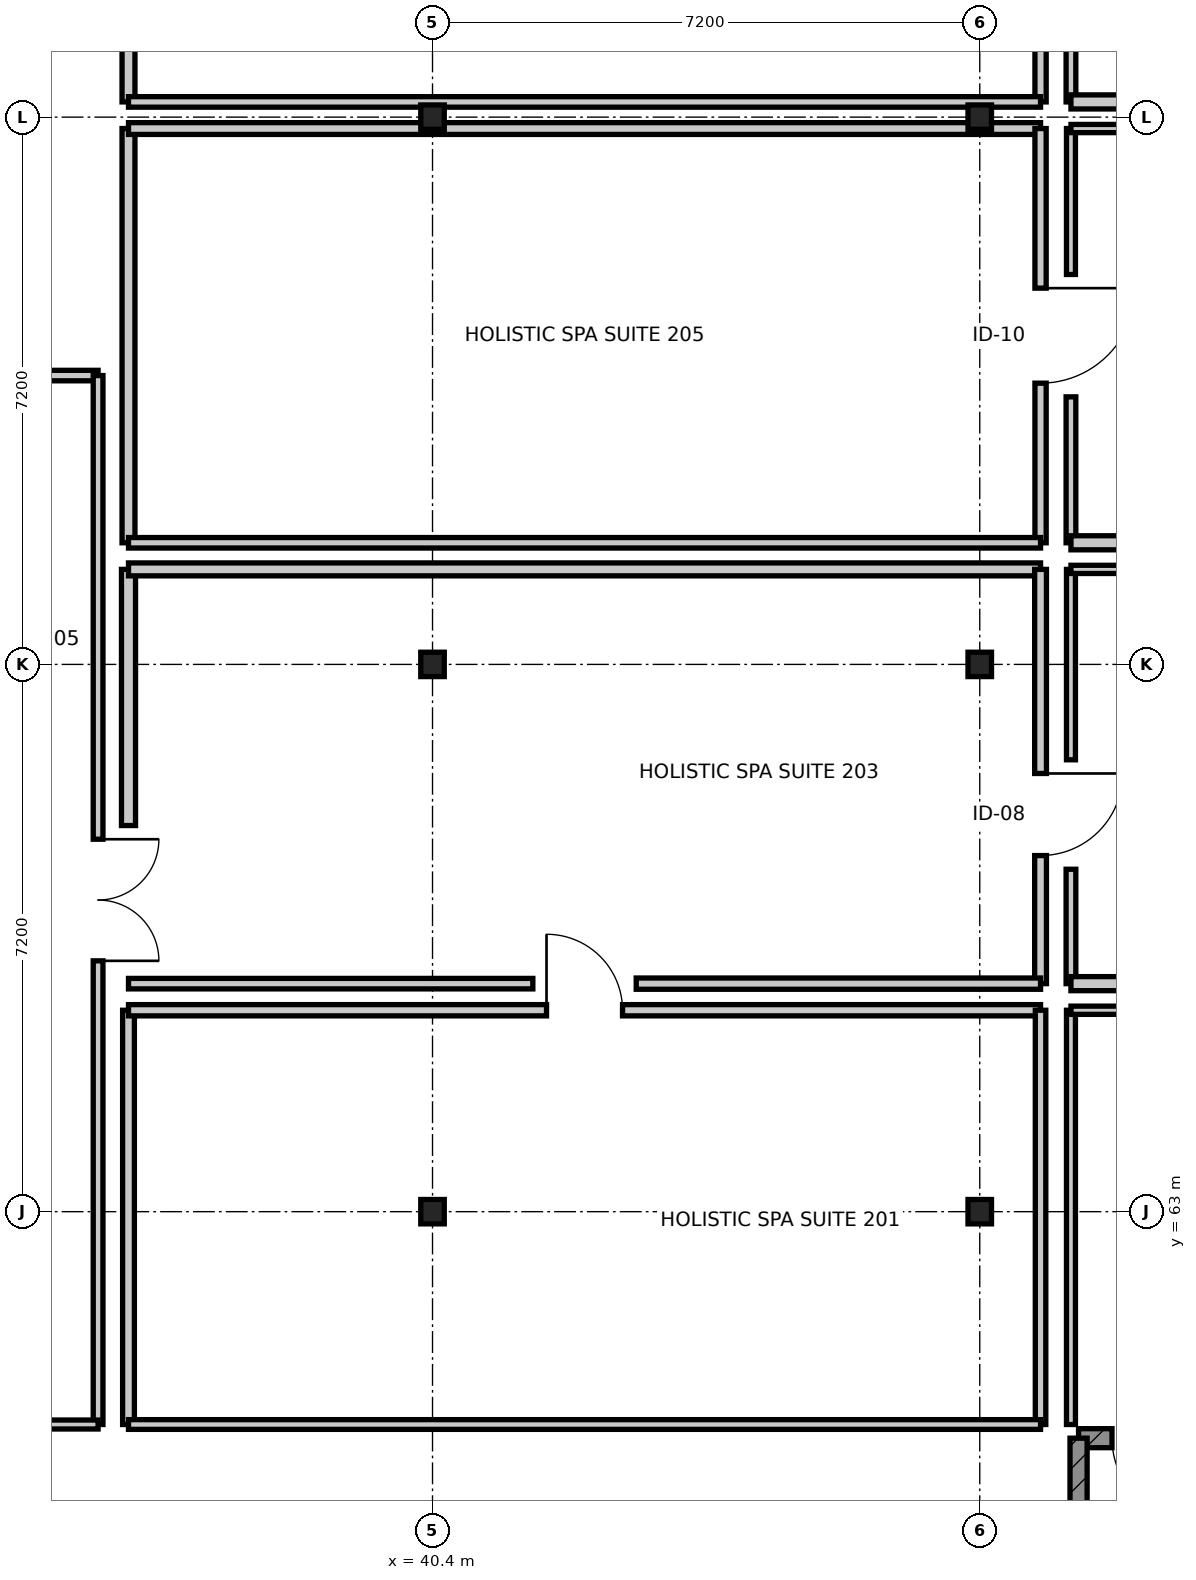
"""IFC4 building model, lengths in metres.
Left out: names, types, materials, properties, quantities, classifications, styles, units other than length and angle.
Written with IfcOpenShell. Run it as: python <this file> out.ifc"""

import sys

from ifc_helpers import new_model, si_unit, direction, frame, frame_2d, origin, origin_2d, place, context, subcontext, project, spatial, rectangle, i_section, extrude, element, fill, save


model = new_model("IFC4")
c1 = context("Model", 3, precision=1e-05, world=origin(), true_north=direction((0.0, 1.0)))
c2 = subcontext(c1, "Body", "Model", "MODEL_VIEW")
j1 = project(units=[si_unit("LENGTHUNIT", "METRE"), si_unit("PLANEANGLEUNIT", "RADIAN")], contexts=[c1])
p1 = place(None, origin())
s1 = spatial("IfcSite", under=j1, at=p1, CompositionType="ELEMENT")
p2 = place(p1, origin())
s2 = spatial("IfcBuilding", under=s1, at=p2, CompositionType="ELEMENT")
p3 = place(p2, frame((0.0, 0.0, 10.5)))
s3 = spatial("IfcBuildingStorey", under=s2, at=p3, CompositionType="ELEMENT", Elevation=10.5)
for number, where, z_axis, x_axis in (
    (1, (40.4, 63.0, 0.0), (0.0, 0.0, 1.0), (1.0, 0.0, 0.0)),
    (2, (40.4, 70.2, 0.0), (0.0, 0.0, 1.0), (1.0, 0.0, 0.0)),
    (3, (40.4, 77.4, 0.0), (0.0, 0.0, 1.0), (1.0, 0.0, 0.0)),
    (4, (47.6, 63.0, 0.0), (0.0, 0.0, 1.0), (1.0, 0.0, 0.0)),
    (5, (47.6, 70.2, 0.0), (0.0, 0.0, 1.0), (1.0, 0.0, 0.0)),
    (6, (47.6, 77.4, 0.0), (0.0, 0.0, 1.0), (1.0, 0.0, 0.0)),
):
    element("IfcColumn", number, at=place(p3, frame(where, z_axis=z_axis, x_axis=x_axis)), inside=s3, PredefinedType="COLUMN", context=c2, shape_type="SweptSolid", body=[
        extrude(i_section(OverallWidth=0.309, OverallDepth=0.321, WebThickness=0.014, FlangeThickness=0.022, FilletRadius=0.015, at=origin_2d()), origin(), (0.0, 0.0, 1.0), 4.5),
    ])
p4 = place(p3, frame((57.5, 60.02, 0.0), z_axis=(0.0, 0.0, 1.0), x_axis=(-1.0, 0.0, 0.0)))
e7 = element("IfcWall", 7, at=p4, inside=s3, PredefinedType="SHEAR", context=c2, shape_type="SweptSolid", body=[
    extrude(rectangle(XDim=8.6, YDim=0.25, at=frame_2d((4.3, 0.0))), origin(), (0.0, 0.0, 1.0), 4.22),
])
p5 = place(p4, frame((7.06, 0.0, 0.0)))
e8 = element("IfcOpeningElement", 8, at=p5, cuts=e7, PredefinedType="OPENING", context=c2, shape_type="SweptSolid", body=[
    extrude(rectangle(XDim=1.1, YDim=2.1, at=frame_2d((0.55, 1.05))), frame((0.0, 0.135, 0.0), z_axis=(0.0, -1.0, 0.0), x_axis=(1.0, 0.0, 0.0)), (0.0, 0.0, 1.0), 0.27),
])
p6 = place(p3, frame((48.9, 60.02, 0.0), z_axis=(0.0, 0.0, 1.0), x_axis=(0.0, -1.0, 0.0)))
e9 = element("IfcWall", 9, at=p6, inside=s3, PredefinedType="SHEAR", context=c2, shape_type="SweptSolid", body=[
    extrude(rectangle(XDim=3.72, YDim=0.225, at=frame_2d((1.86, 0.0))), origin(), (0.0, 0.0, 1.0), 4.22),
])
p7 = place(p3, frame((12.2, 74.0, 0.0), z_axis=(0.0, 0.0, 1.0), x_axis=(1.0, 0.0, 0.0)))
e10 = element("IfcWall", 10, at=p7, inside=s3, PredefinedType="PARTITIONING", context=c2, shape_type="SweptSolid", body=[
    extrude(rectangle(XDim=23.8, YDim=0.138, at=frame_2d((11.9, 0.0))), origin(), (0.0, 0.0, 1.0), 3.796),
])
p8 = place(p3, frame((36.0, 74.0, 0.0), z_axis=(0.0, 0.0, 1.0), x_axis=(0.0, -1.0, 0.0)))
e11 = element("IfcWall", 11, at=p8, inside=s3, PredefinedType="PARTITIONING", context=c2, shape_type="SweptSolid", body=[
    extrude(rectangle(XDim=13.8, YDim=0.128, at=frame_2d((6.9, 0.0))), origin(), (0.0, 0.0, 1.0), 3.555),
])
p9 = place(p8, frame((6.1, 0.0, 0.0)))
e12 = element("IfcOpeningElement", 12, at=p9, cuts=e11, PredefinedType="OPENING", context=c2, shape_type="SweptSolid", body=[
    extrude(rectangle(XDim=1.6, YDim=2.15, at=frame_2d((0.8, 1.075))), frame((0.0, 0.074, 0.0), z_axis=(0.0, -1.0, 0.0), x_axis=(1.0, 0.0, 0.0)), (0.0, 0.0, 1.0), 0.148),
])
p10 = place(p3, frame((36.0, 60.2, 0.0), z_axis=(0.0, 0.0, 1.0), x_axis=(-1.0, 0.0, 0.0)))
e13 = element("IfcWall", 13, at=p10, inside=s3, PredefinedType="PARTITIONING", context=c2, shape_type="SweptSolid", body=[
    extrude(rectangle(XDim=23.8, YDim=0.118, at=frame_2d((11.9, 0.0))), origin(), (0.0, 0.0, 1.0), 3.796),
])
p11 = place(p3, frame((36.4, 60.2, 0.0), z_axis=(0.0, 0.0, 1.0), x_axis=(0.0, 1.0, 0.0)))
e14 = element("IfcWall", 14, at=p11, inside=s3, PredefinedType="PARTITIONING", context=c2, shape_type="SweptSolid", body=[
    extrude(rectangle(XDim=5.45, YDim=0.155, at=frame_2d((2.725, 0.0))), origin(), (0.0, 0.0, 1.0), 3.555),
])
p12 = place(p3, frame((36.4, 65.65, 0.0), z_axis=(0.0, 0.0, 1.0), x_axis=(1.0, 0.0, 0.0)))
e15 = element("IfcWall", 15, at=p12, inside=s3, PredefinedType="PARTITIONING", context=c2, shape_type="SweptSolid", body=[
    extrude(rectangle(XDim=12.0, YDim=0.148, at=frame_2d((6.0, 0.0))), origin(), (0.0, 0.0, 1.0), 3.796),
])
p13 = place(p12, frame((5.5, 0.0, 0.0)))
e16 = element("IfcOpeningElement", 16, at=p13, cuts=e15, PredefinedType="OPENING", context=c2, shape_type="SweptSolid", body=[
    extrude(rectangle(XDim=1.0, YDim=2.1, at=frame_2d((0.5, 1.05))), frame((0.0, 0.084, 0.0), z_axis=(0.0, -1.0, 0.0), x_axis=(1.0, 0.0, 0.0)), (0.0, 0.0, 1.0), 0.168),
])
p14 = place(p3, frame((48.4, 65.65, 0.0), z_axis=(0.0, 0.0, 1.0), x_axis=(0.0, -1.0, 0.0)))
e17 = element("IfcWall", 17, at=p14, inside=s3, PredefinedType="PARTITIONING", context=c2, shape_type="SweptSolid", body=[
    extrude(rectangle(XDim=5.45, YDim=0.138, at=frame_2d((2.725, 0.0))), origin(), (0.0, 0.0, 1.0), 3.555),
])
p15 = place(p3, frame((48.4, 60.2, 0.0), z_axis=(0.0, 0.0, 1.0), x_axis=(-1.0, 0.0, 0.0)))
e18 = element("IfcWall", 18, at=p15, inside=s3, PredefinedType="PARTITIONING", context=c2, shape_type="SweptSolid", body=[
    extrude(rectangle(XDim=12.0, YDim=0.128, at=frame_2d((6.0, 0.0))), origin(), (0.0, 0.0, 1.0), 3.796),
])
p16 = place(p3, frame((48.8, 60.2, 0.0), z_axis=(0.0, 0.0, 1.0), x_axis=(0.0, 1.0, 0.0)))
e19 = element("IfcWall", 19, at=p16, inside=s3, PredefinedType="PARTITIONING", context=c2, shape_type="SweptSolid", body=[
    extrude(rectangle(XDim=5.45, YDim=0.118, at=frame_2d((2.725, 0.0))), origin(), (0.0, 0.0, 1.0), 3.555),
])
p17 = place(p3, frame((48.8, 65.65, 0.0), z_axis=(0.0, 0.0, 1.0), x_axis=(1.0, 0.0, 0.0)))
e20 = element("IfcWall", 20, at=p17, inside=s3, PredefinedType="PARTITIONING", context=c2, shape_type="SweptSolid", body=[
    extrude(rectangle(XDim=12.0, YDim=0.108, at=frame_2d((6.0, 0.0))), origin(), (0.0, 0.0, 1.0), 3.796),
])
p18 = place(p3, frame((36.4, 68.08, 0.0), z_axis=(0.0, 0.0, 1.0), x_axis=(0.0, 1.0, 0.0)))
e21 = element("IfcWall", 21, at=p18, inside=s3, PredefinedType="PARTITIONING", context=c2, shape_type="SweptSolid", body=[
    extrude(rectangle(XDim=3.37, YDim=0.185, at=frame_2d((1.685, 0.0))), origin(), (0.0, 0.0, 1.0), 3.555),
])
p19 = place(p3, frame((36.4, 71.45, 0.0), z_axis=(0.0, 0.0, 1.0), x_axis=(1.0, 0.0, 0.0)))
e22 = element("IfcWall", 22, at=p19, inside=s3, PredefinedType="PARTITIONING", context=c2, shape_type="SweptSolid", body=[
    extrude(rectangle(XDim=12.0, YDim=0.17, at=frame_2d((6.0, 0.0))), origin(), (0.0, 0.0, 1.0), 3.796),
])
p20 = place(p3, frame((48.4, 71.45, 0.0), z_axis=(0.0, 0.0, 1.0), x_axis=(0.0, -1.0, 0.0)))
e23 = element("IfcWall", 23, at=p20, inside=s3, PredefinedType="PARTITIONING", context=c2, shape_type="SweptSolid", body=[
    extrude(rectangle(XDim=5.45, YDim=0.155, at=frame_2d((2.725, 0.0))), origin(), (0.0, 0.0, 1.0), 3.555),
])
p21 = place(p20, frame((2.685, 0.0, 0.0)))
e24 = element("IfcOpeningElement", 24, at=p21, cuts=e23, PredefinedType="OPENING", context=c2, shape_type="SweptSolid", body=[
    extrude(rectangle(XDim=1.08, YDim=2.15, at=frame_2d((0.54, 1.075))), frame((0.0, 0.087, 0.0), z_axis=(0.0, -1.0, 0.0), x_axis=(1.0, 0.0, 0.0)), (0.0, 0.0, 1.0), 0.175),
])
p22 = place(p3, frame((48.4, 66.0, 0.0), z_axis=(0.0, 0.0, 1.0), x_axis=(-1.0, 0.0, 0.0)))
e25 = element("IfcWall", 25, at=p22, inside=s3, PredefinedType="PARTITIONING", context=c2, shape_type="SweptSolid", body=[
    extrude(rectangle(XDim=5.32, YDim=0.148, at=frame_2d((2.66, 0.0))), origin(), (0.0, 0.0, 1.0), 3.796),
])
p23 = place(p3, frame((41.72, 66.0, 0.0), z_axis=(0.0, 0.0, 1.0), x_axis=(-1.0, 0.0, 0.0)))
e26 = element("IfcWall", 26, at=p23, inside=s3, PredefinedType="PARTITIONING", context=c2, shape_type="SweptSolid", body=[
    extrude(rectangle(XDim=5.32, YDim=0.138, at=frame_2d((2.66, 0.0))), origin(), (0.0, 0.0, 1.0), 3.796),
])
p24 = place(p3, frame((48.8, 66.0, 0.0), z_axis=(0.0, 0.0, 1.0), x_axis=(0.0, 1.0, 0.0)))
e27 = element("IfcWall", 27, at=p24, inside=s3, PredefinedType="PARTITIONING", context=c2, shape_type="SweptSolid", body=[
    extrude(rectangle(XDim=1.505, YDim=0.128, at=frame_2d((0.752, 0.0))), origin(), (0.0, 0.0, 1.0), 3.898),
])
p25 = place(p3, frame((48.8, 68.945, 0.0), z_axis=(0.0, 0.0, 1.0), x_axis=(0.0, 1.0, 0.0)))
e28 = element("IfcWall", 28, at=p25, inside=s3, PredefinedType="PARTITIONING", context=c2, shape_type="SweptSolid", body=[
    extrude(rectangle(XDim=2.505, YDim=0.118, at=frame_2d((1.252, 0.0))), origin(), (0.0, 0.0, 1.0), 3.555),
])
p26 = place(p3, frame((48.8, 71.45, 0.0), z_axis=(0.0, 0.0, 1.0), x_axis=(1.0, 0.0, 0.0)))
e29 = element("IfcWall", 29, at=p26, inside=s3, PredefinedType="PARTITIONING", context=c2, shape_type="SweptSolid", body=[
    extrude(rectangle(XDim=12.0, YDim=0.108, at=frame_2d((6.0, 0.0))), origin(), (0.0, 0.0, 1.0), 3.796),
])
p27 = place(p3, frame((60.8, 66.0, 0.0), z_axis=(0.0, 0.0, 1.0), x_axis=(-1.0, 0.0, 0.0)))
e30 = element("IfcWall", 30, at=p27, inside=s3, PredefinedType="PARTITIONING", context=c2, shape_type="SweptSolid", body=[
    extrude(rectangle(XDim=12.0, YDim=0.185, at=frame_2d((6.0, 0.0))), origin(), (0.0, 0.0, 1.0), 3.796),
])
p28 = place(p3, frame((36.4, 71.8, 0.0), z_axis=(0.0, 0.0, 1.0), x_axis=(0.0, 1.0, 0.0)))
e31 = element("IfcWall", 31, at=p28, inside=s3, PredefinedType="PARTITIONING", context=c2, shape_type="SweptSolid", body=[
    extrude(rectangle(XDim=5.45, YDim=0.17, at=frame_2d((2.725, 0.0))), origin(), (0.0, 0.0, 1.0), 3.555),
])
p29 = place(p3, frame((36.4, 77.25, 0.0), z_axis=(0.0, 0.0, 1.0), x_axis=(1.0, 0.0, 0.0)))
e32 = element("IfcWall", 32, at=p29, inside=s3, PredefinedType="PARTITIONING", context=c2, shape_type="SweptSolid", body=[
    extrude(rectangle(XDim=12.0, YDim=0.155, at=frame_2d((6.0, 0.0))), origin(), (0.0, 0.0, 1.0), 3.555),
])
p30 = place(p3, frame((48.4, 77.25, 0.0), z_axis=(0.0, 0.0, 1.0), x_axis=(0.0, -1.0, 0.0)))
e33 = element("IfcWall", 33, at=p30, inside=s3, PredefinedType="PARTITIONING", context=c2, shape_type="SweptSolid", body=[
    extrude(rectangle(XDim=5.45, YDim=0.148, at=frame_2d((2.725, 0.0))), origin(), (0.0, 0.0, 1.0), 3.555),
])
p31 = place(p30, frame((2.1, 0.0, 0.0)))
e34 = element("IfcOpeningElement", 34, at=p31, cuts=e33, PredefinedType="OPENING", context=c2, shape_type="SweptSolid", body=[
    extrude(rectangle(XDim=1.25, YDim=2.2, at=frame_2d((0.625, 1.1))), frame((0.0, 0.084, 0.0), z_axis=(0.0, -1.0, 0.0), x_axis=(1.0, 0.0, 0.0)), (0.0, 0.0, 1.0), 0.168),
])
p32 = place(p3, frame((48.4, 71.8, 0.0), z_axis=(0.0, 0.0, 1.0), x_axis=(-1.0, 0.0, 0.0)))
e35 = element("IfcWall", 35, at=p32, inside=s3, PredefinedType="PARTITIONING", context=c2, shape_type="SweptSolid", body=[
    extrude(rectangle(XDim=12.0, YDim=0.138, at=frame_2d((6.0, 0.0))), origin(), (0.0, 0.0, 1.0), 3.796),
])
p33 = place(p3, frame((48.8, 71.8, 0.0), z_axis=(0.0, 0.0, 1.0), x_axis=(0.0, 1.0, 0.0)))
e36 = element("IfcWall", 36, at=p33, inside=s3, PredefinedType="PARTITIONING", context=c2, shape_type="SweptSolid", body=[
    extrude(rectangle(XDim=1.92, YDim=0.128, at=frame_2d((0.96, 0.0))), origin(), (0.0, 0.0, 1.0), 3.898),
])
p34 = place(p3, frame((48.8, 75.33, 0.0), z_axis=(0.0, 0.0, 1.0), x_axis=(0.0, 1.0, 0.0)))
e37 = element("IfcWall", 37, at=p34, inside=s3, PredefinedType="PARTITIONING", context=c2, shape_type="SweptSolid", body=[
    extrude(rectangle(XDim=1.92, YDim=0.118, at=frame_2d((0.96, 0.0))), origin(), (0.0, 0.0, 1.0), 3.555),
])
p35 = place(p3, frame((48.8, 77.25, 0.0), z_axis=(0.0, 0.0, 1.0), x_axis=(1.0, 0.0, 0.0)))
e38 = element("IfcWall", 38, at=p35, inside=s3, PredefinedType="PARTITIONING", context=c2, shape_type="SweptSolid", body=[
    extrude(rectangle(XDim=12.0, YDim=0.108, at=frame_2d((6.0, 0.0))), origin(), (0.0, 0.0, 1.0), 3.555),
])
p36 = place(p3, frame((60.8, 71.8, 0.0), z_axis=(0.0, 0.0, 1.0), x_axis=(-1.0, 0.0, 0.0)))
e39 = element("IfcWall", 39, at=p36, inside=s3, PredefinedType="PARTITIONING", context=c2, shape_type="SweptSolid", body=[
    extrude(rectangle(XDim=12.0, YDim=0.185, at=frame_2d((6.0, 0.0))), origin(), (0.0, 0.0, 1.0), 3.796),
])
p37 = place(p3, frame((36.4, 77.6, 0.0), z_axis=(0.0, 0.0, 1.0), x_axis=(0.0, 1.0, 0.0)))
e40 = element("IfcWall", 40, at=p37, inside=s3, PredefinedType="PARTITIONING", context=c2, shape_type="SweptSolid", body=[
    extrude(rectangle(XDim=5.45, YDim=0.17, at=frame_2d((2.725, 0.0))), origin(), (0.0, 0.0, 1.0), 3.555),
])
p38 = place(p3, frame((48.4, 83.05, 0.0), z_axis=(0.0, 0.0, 1.0), x_axis=(0.0, -1.0, 0.0)))
e41 = element("IfcWall", 41, at=p38, inside=s3, PredefinedType="PARTITIONING", context=c2, shape_type="SweptSolid", body=[
    extrude(rectangle(XDim=5.45, YDim=0.148, at=frame_2d((2.725, 0.0))), origin(), (0.0, 0.0, 1.0), 3.555),
])
p39 = place(p38, frame((2.22, 0.0, 0.0)))
e42 = element("IfcOpeningElement", 42, at=p39, cuts=e41, PredefinedType="OPENING", context=c2, shape_type="SweptSolid", body=[
    extrude(rectangle(XDim=1.01, YDim=2.16, at=frame_2d((0.505, 1.08))), frame((0.0, 0.084, 0.0), z_axis=(0.0, -1.0, 0.0), x_axis=(1.0, 0.0, 0.0)), (0.0, 0.0, 1.0), 0.168),
])
p40 = place(p3, frame((48.4, 77.6, 0.0), z_axis=(0.0, 0.0, 1.0), x_axis=(-1.0, 0.0, 0.0)))
e43 = element("IfcWall", 43, at=p40, inside=s3, PredefinedType="PARTITIONING", context=c2, shape_type="SweptSolid", body=[
    extrude(rectangle(XDim=12.0, YDim=0.138, at=frame_2d((6.0, 0.0))), origin(), (0.0, 0.0, 1.0), 3.555),
])
p41 = place(p3, frame((48.8, 77.6, 0.0), z_axis=(0.0, 0.0, 1.0), x_axis=(0.0, 1.0, 0.0)))
e44 = element("IfcWall", 44, at=p41, inside=s3, PredefinedType="PARTITIONING", context=c2, shape_type="SweptSolid", body=[
    extrude(rectangle(XDim=2.04, YDim=0.128, at=frame_2d((1.02, 0.0))), origin(), (0.0, 0.0, 1.0), 3.555),
])
p42 = place(p3, frame((60.8, 77.6, 0.0), z_axis=(0.0, 0.0, 1.0), x_axis=(-1.0, 0.0, 0.0)))
e45 = element("IfcWall", 45, at=p42, inside=s3, PredefinedType="PARTITIONING", context=c2, shape_type="SweptSolid", body=[
    extrude(rectangle(XDim=12.0, YDim=0.185, at=frame_2d((6.0, 0.0))), origin(), (0.0, 0.0, 1.0), 3.555),
])
p43 = place(p5, origin())
e46 = element("IfcDoor", 46, at=p43, inside=s3, OperationType="SINGLE_SWING_LEFT", PredefinedType="DOOR", context=c2, shape_type="SweptSolid", body=[
    extrude(rectangle(XDim=1.1, YDim=2.1, at=frame_2d((0.55, 1.05))), frame((0.0, 0.025, 0.0), z_axis=(0.0, -1.0, 0.0), x_axis=(1.0, 0.0, 0.0)), (0.0, 0.0, 1.0), 0.05),
])
fill(e8, e46)
p44 = place(p9, origin())
e47 = element("IfcDoor", 47, at=p44, inside=s3, OperationType="DOUBLE_DOOR_SINGLE_SWING", PredefinedType="DOOR", context=c2, shape_type="SweptSolid", body=[
    extrude(rectangle(XDim=1.6, YDim=2.15, at=frame_2d((0.8, 1.075))), frame((0.0, 0.025, 0.0), z_axis=(0.0, -1.0, 0.0), x_axis=(1.0, 0.0, 0.0)), (0.0, 0.0, 1.0), 0.05),
])
fill(e12, e47)
p45 = place(p13, origin())
e48 = element("IfcDoor", 48, at=p45, inside=s3, OperationType="SINGLE_SWING_LEFT", PredefinedType="DOOR", context=c2, shape_type="SweptSolid", body=[
    extrude(rectangle(XDim=1.0, YDim=2.1, at=frame_2d((0.5, 1.05))), frame((0.0, 0.025, 0.0), z_axis=(0.0, -1.0, 0.0), x_axis=(1.0, 0.0, 0.0)), (0.0, 0.0, 1.0), 0.05),
])
fill(e16, e48)
p46 = place(p21, origin())
e49 = element("IfcDoor", 49, at=p46, inside=s3, OperationType="SINGLE_SWING_LEFT", PredefinedType="DOOR", context=c2, shape_type="SweptSolid", body=[
    extrude(rectangle(XDim=1.08, YDim=2.15, at=frame_2d((0.54, 1.075))), frame((0.0, 0.025, 0.0), z_axis=(0.0, -1.0, 0.0), x_axis=(1.0, 0.0, 0.0)), (0.0, 0.0, 1.0), 0.05),
])
fill(e24, e49)
p47 = place(p31, origin())
e50 = element("IfcDoor", 50, at=p47, inside=s3, OperationType="SINGLE_SWING_LEFT", PredefinedType="DOOR", context=c2, shape_type="SweptSolid", body=[
    extrude(rectangle(XDim=1.25, YDim=2.2, at=frame_2d((0.625, 1.1))), frame((0.0, 0.025, 0.0), z_axis=(0.0, -1.0, 0.0), x_axis=(1.0, 0.0, 0.0)), (0.0, 0.0, 1.0), 0.05),
])
fill(e34, e50)
save(model, sys.argv[1])
